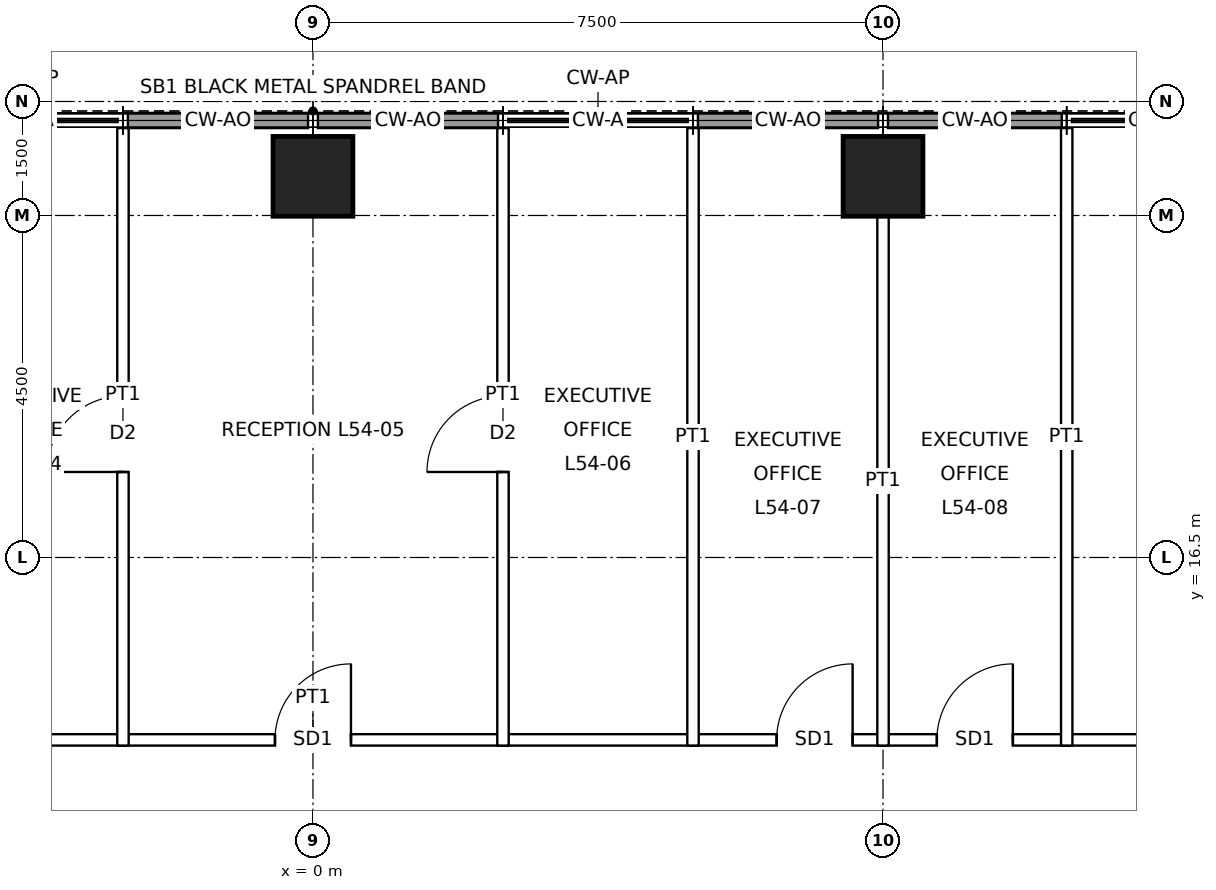
"""IFC4 building model, lengths in metres.
Left out: names, types, materials, properties, quantities, classifications, styles, units other than length and angle.
Written with IfcOpenShell. Run it as: python <this file> out.ifc"""

import sys

from ifc_helpers import new_model, si_unit, direction, frame, frame_2d, origin, origin_2d, place, context, subcontext, project, spatial, rectangle, hollow_rectangle, extrude, element, fill, save


model = new_model("IFC4")
c1 = context("Model", 3, precision=1e-05, world=origin(), true_north=direction((0.0, 1.0)))
c2 = subcontext(c1, "Body", "Model", "MODEL_VIEW")
j1 = project(units=[si_unit("LENGTHUNIT", "METRE"), si_unit("PLANEANGLEUNIT", "RADIAN")], contexts=[c1])
p1 = place(None, origin())
s1 = spatial("IfcSite", under=j1, at=p1, CompositionType="ELEMENT")
p2 = place(p1, origin())
s2 = spatial("IfcBuilding", under=s1, at=p2, CompositionType="ELEMENT")
p3 = place(p2, frame((0.0, 0.0, 249.9)))
s3 = spatial("IfcBuildingStorey", under=s2, at=p3, CompositionType="ELEMENT", Elevation=249.9)
for number, where, z_axis, x_axis in (
    (1, (0.0, 21.515, 0.0), (0.0, 0.0, 1.0), (1.0, 0.0, 0.0)),
    (2, (7.5, 21.515, 0.0), (0.0, 0.0, 1.0), (1.0, 0.0, 0.0)),
):
    element("IfcColumn", number, at=place(p3, frame(where, z_axis=z_axis, x_axis=x_axis)), inside=s3, PredefinedType="COLUMN", context=c2, shape_type="SweptSolid", body=[
        extrude(hollow_rectangle(XDim=1.05, YDim=1.05, WallThickness=0.07, at=origin_2d()), origin(), (0.0, 0.0, 1.0), 4.0),
    ])
for number, where, z_axis, x_axis in (
    (3, (-2.435, 22.25, 0.0), (0.0, 0.0, 1.0), (1.0, 0.0, 0.0)),
    (4, (0.065, 22.25, 0.0), (0.0, 0.0, 1.0), (1.0, 0.0, 0.0)),
    (5, (5.065, 22.25, 0.0), (0.0, 0.0, 1.0), (1.0, 0.0, 0.0)),
):
    element("IfcWall", number, at=place(p3, frame(where, z_axis=z_axis, x_axis=x_axis)), inside=s3, PredefinedType="SOLIDWALL", context=c2, shape_type="SweptSolid", body=[
        extrude(rectangle(XDim=2.37, YDim=0.2, at=frame_2d((1.185, 0.0))), origin(), (0.0, 0.0, 1.0), 3.75),
    ])
p4 = place(p3, frame((7.565, 22.25, 0.0), z_axis=(0.0, 0.0, 1.0), x_axis=(1.0, 0.0, 0.0)))
e6 = element("IfcWall", 6, at=p4, inside=s3, PredefinedType="SOLIDWALL", context=c2, shape_type="SweptSolid", body=[
    extrude(rectangle(XDim=2.287, YDim=0.2, at=frame_2d((1.144, 0.0))), origin(), (0.0, 0.0, 1.0), 3.75),
])
p5 = place(p3, frame((-14.175, 14.1, 0.0), z_axis=(0.0, 0.0, 1.0), x_axis=(1.0, 0.0, 0.0)))
e7 = element("IfcWall", 7, at=p5, inside=s3, PredefinedType="PARTITIONING", context=c2, shape_type="SweptSolid", body=[
    extrude(rectangle(XDim=28.35, YDim=0.15, at=frame_2d((14.175, 0.0))), origin(), (0.0, 0.0, 1.0), 3.75),
])
p6 = place(p5, frame((4.967, 0.0, 0.0)))
e8 = element("IfcOpeningElement", 8, at=p6, cuts=e7, PredefinedType="OPENING", context=c2, shape_type="SweptSolid", body=[
    extrude(rectangle(XDim=1.0, YDim=2.4, at=frame_2d((0.5, 1.2))), frame((0.0, 0.085, 0.0), z_axis=(0.0, -1.0, 0.0), x_axis=(1.0, 0.0, 0.0)), (0.0, 0.0, 1.0), 0.17),
])
p7 = place(p5, frame((7.075, 0.0, 0.0)))
e9 = element("IfcOpeningElement", 9, at=p7, cuts=e7, PredefinedType="OPENING", context=c2, shape_type="SweptSolid", body=[
    extrude(rectangle(XDim=1.0, YDim=2.4, at=frame_2d((0.5, 1.2))), frame((0.0, 0.085, 0.0), z_axis=(0.0, -1.0, 0.0), x_axis=(1.0, 0.0, 0.0)), (0.0, 0.0, 1.0), 0.17),
])
p8 = place(p5, frame((13.675, 0.0, 0.0)))
e10 = element("IfcOpeningElement", 10, at=p8, cuts=e7, PredefinedType="OPENING", context=c2, shape_type="SweptSolid", body=[
    extrude(rectangle(XDim=1.0, YDim=2.4, at=frame_2d((0.5, 1.2))), frame((0.0, 0.085, 0.0), z_axis=(0.0, -1.0, 0.0), x_axis=(1.0, 0.0, 0.0)), (0.0, 0.0, 1.0), 0.17),
])
p9 = place(p5, frame((20.275, 0.0, 0.0)))
e11 = element("IfcOpeningElement", 11, at=p9, cuts=e7, PredefinedType="OPENING", context=c2, shape_type="SweptSolid", body=[
    extrude(rectangle(XDim=1.0, YDim=2.4, at=frame_2d((0.5, 1.2))), frame((0.0, 0.085, 0.0), z_axis=(0.0, -1.0, 0.0), x_axis=(1.0, 0.0, 0.0)), (0.0, 0.0, 1.0), 0.17),
])
p10 = place(p5, frame((22.384, 0.0, 0.0)))
e12 = element("IfcOpeningElement", 12, at=p10, cuts=e7, PredefinedType="OPENING", context=c2, shape_type="SweptSolid", body=[
    extrude(rectangle(XDim=1.0, YDim=2.4, at=frame_2d((0.5, 1.2))), frame((0.0, 0.085, 0.0), z_axis=(0.0, -1.0, 0.0), x_axis=(1.0, 0.0, 0.0)), (0.0, 0.0, 1.0), 0.17),
])
p11 = place(p5, frame((25.684, 0.0, 0.0)))
e13 = element("IfcOpeningElement", 13, at=p11, cuts=e7, PredefinedType="OPENING", context=c2, shape_type="SweptSolid", body=[
    extrude(rectangle(XDim=1.0, YDim=2.4, at=frame_2d((0.5, 1.2))), frame((0.0, 0.085, 0.0), z_axis=(0.0, -1.0, 0.0), x_axis=(1.0, 0.0, 0.0)), (0.0, 0.0, 1.0), 0.17),
])
p12 = place(p5, frame((1.667, 0.0, 0.0)))
e14 = element("IfcOpeningElement", 14, at=p12, cuts=e7, PredefinedType="OPENING", context=c2, shape_type="SweptSolid", body=[
    extrude(rectangle(XDim=1.0, YDim=2.4, at=frame_2d((0.5, 1.2))), frame((0.0, 0.085, 0.0), z_axis=(0.0, -1.0, 0.0), x_axis=(1.0, 0.0, 0.0)), (0.0, 0.0, 1.0), 0.17),
])
p13 = place(p3, frame((-2.5, 14.025, 0.0), z_axis=(0.0, 0.0, 1.0), x_axis=(0.0, 1.0, 0.0)))
e15 = element("IfcWall", 15, at=p13, inside=s3, PredefinedType="PARTITIONING", context=c2, shape_type="SweptSolid", body=[
    extrude(rectangle(XDim=8.125, YDim=0.15, at=frame_2d((4.062, 0.0))), origin(), (0.0, 0.0, 1.0), 3.75),
])
p14 = place(p13, frame((3.6, 0.0, 0.0)))
e16 = element("IfcOpeningElement", 16, at=p14, cuts=e15, PredefinedType="OPENING", context=c2, shape_type="SweptSolid", body=[
    extrude(rectangle(XDim=1.0, YDim=2.1, at=frame_2d((0.5, 1.05))), frame((0.0, 0.085, 0.0), z_axis=(0.0, -1.0, 0.0), x_axis=(1.0, 0.0, 0.0)), (0.0, 0.0, 1.0), 0.17),
])
p15 = place(p3, frame((2.5, 14.025, 0.0), z_axis=(0.0, 0.0, 1.0), x_axis=(0.0, 1.0, 0.0)))
e17 = element("IfcWall", 17, at=p15, inside=s3, PredefinedType="PARTITIONING", context=c2, shape_type="SweptSolid", body=[
    extrude(rectangle(XDim=8.125, YDim=0.15, at=frame_2d((4.062, 0.0))), origin(), (0.0, 0.0, 1.0), 3.75),
])
p16 = place(p15, frame((3.6, 0.0, 0.0)))
e18 = element("IfcOpeningElement", 18, at=p16, cuts=e17, PredefinedType="OPENING", context=c2, shape_type="SweptSolid", body=[
    extrude(rectangle(XDim=1.0, YDim=2.1, at=frame_2d((0.5, 1.05))), frame((0.0, 0.085, 0.0), z_axis=(0.0, -1.0, 0.0), x_axis=(1.0, 0.0, 0.0)), (0.0, 0.0, 1.0), 0.17),
])
p17 = place(p3, frame((5.0, 14.025, 0.0), z_axis=(0.0, 0.0, 1.0), x_axis=(0.0, 1.0, 0.0)))
e19 = element("IfcWall", 19, at=p17, inside=s3, PredefinedType="PARTITIONING", context=c2, shape_type="SweptSolid", body=[
    extrude(rectangle(XDim=8.125, YDim=0.15, at=frame_2d((4.062, 0.0))), origin(), (0.0, 0.0, 1.0), 3.75),
])
p18 = place(p3, frame((7.5, 14.025, 0.0), z_axis=(0.0, 0.0, 1.0), x_axis=(0.0, 1.0, 0.0)))
e20 = element("IfcWall", 20, at=p18, inside=s3, PredefinedType="PARTITIONING", context=c2, shape_type="SweptSolid", body=[
    extrude(rectangle(XDim=6.965, YDim=0.15, at=frame_2d((3.482, 0.0))), origin(), (0.0, 0.0, 1.0), 3.75),
])
p19 = place(p3, frame((9.917, 14.025, 0.0), z_axis=(0.0, 0.0, 1.0), x_axis=(0.0, 1.0, 0.0)))
e21 = element("IfcWall", 21, at=p19, inside=s3, PredefinedType="PARTITIONING", context=c2, shape_type="SweptSolid", body=[
    extrude(rectangle(XDim=8.125, YDim=0.15, at=frame_2d((4.062, 0.0))), origin(), (0.0, 0.0, 1.0), 3.75),
])
p20 = place(p14, origin())
e22 = element("IfcDoor", 22, at=p20, inside=s3, OperationType="SINGLE_SWING_LEFT", PredefinedType="DOOR", context=c2, shape_type="SweptSolid", body=[
    extrude(rectangle(XDim=1.0, YDim=2.1, at=frame_2d((0.5, 1.05))), frame((0.0, 0.025, 0.0), z_axis=(0.0, -1.0, 0.0), x_axis=(1.0, 0.0, 0.0)), (0.0, 0.0, 1.0), 0.05),
])
fill(e16, e22)
p21 = place(p8, origin())
e23 = element("IfcDoor", 23, at=p21, inside=s3, OperationType="SINGLE_SWING_RIGHT", PredefinedType="DOOR", context=c2, shape_type="SweptSolid", body=[
    extrude(rectangle(XDim=1.0, YDim=2.4, at=frame_2d((0.5, 1.2))), frame((0.0, 0.025, 0.0), z_axis=(0.0, -1.0, 0.0), x_axis=(1.0, 0.0, 0.0)), (0.0, 0.0, 1.0), 0.05),
])
fill(e10, e23)
p22 = place(p16, origin())
e24 = element("IfcDoor", 24, at=p22, inside=s3, OperationType="SINGLE_SWING_LEFT", PredefinedType="DOOR", context=c2, shape_type="SweptSolid", body=[
    extrude(rectangle(XDim=1.0, YDim=2.1, at=frame_2d((0.5, 1.05))), frame((0.0, 0.025, 0.0), z_axis=(0.0, -1.0, 0.0), x_axis=(1.0, 0.0, 0.0)), (0.0, 0.0, 1.0), 0.05),
])
fill(e18, e24)
p23 = place(p9, origin())
e25 = element("IfcDoor", 25, at=p23, inside=s3, OperationType="SINGLE_SWING_RIGHT", PredefinedType="DOOR", context=c2, shape_type="SweptSolid", body=[
    extrude(rectangle(XDim=1.0, YDim=2.4, at=frame_2d((0.5, 1.2))), frame((0.0, 0.025, 0.0), z_axis=(0.0, -1.0, 0.0), x_axis=(1.0, 0.0, 0.0)), (0.0, 0.0, 1.0), 0.05),
])
fill(e11, e25)
p24 = place(p10, origin())
e26 = element("IfcDoor", 26, at=p24, inside=s3, OperationType="SINGLE_SWING_RIGHT", PredefinedType="DOOR", context=c2, shape_type="SweptSolid", body=[
    extrude(rectangle(XDim=1.0, YDim=2.4, at=frame_2d((0.5, 1.2))), frame((0.0, 0.025, 0.0), z_axis=(0.0, -1.0, 0.0), x_axis=(1.0, 0.0, 0.0)), (0.0, 0.0, 1.0), 0.05),
])
fill(e12, e26)
save(model, sys.argv[1])
